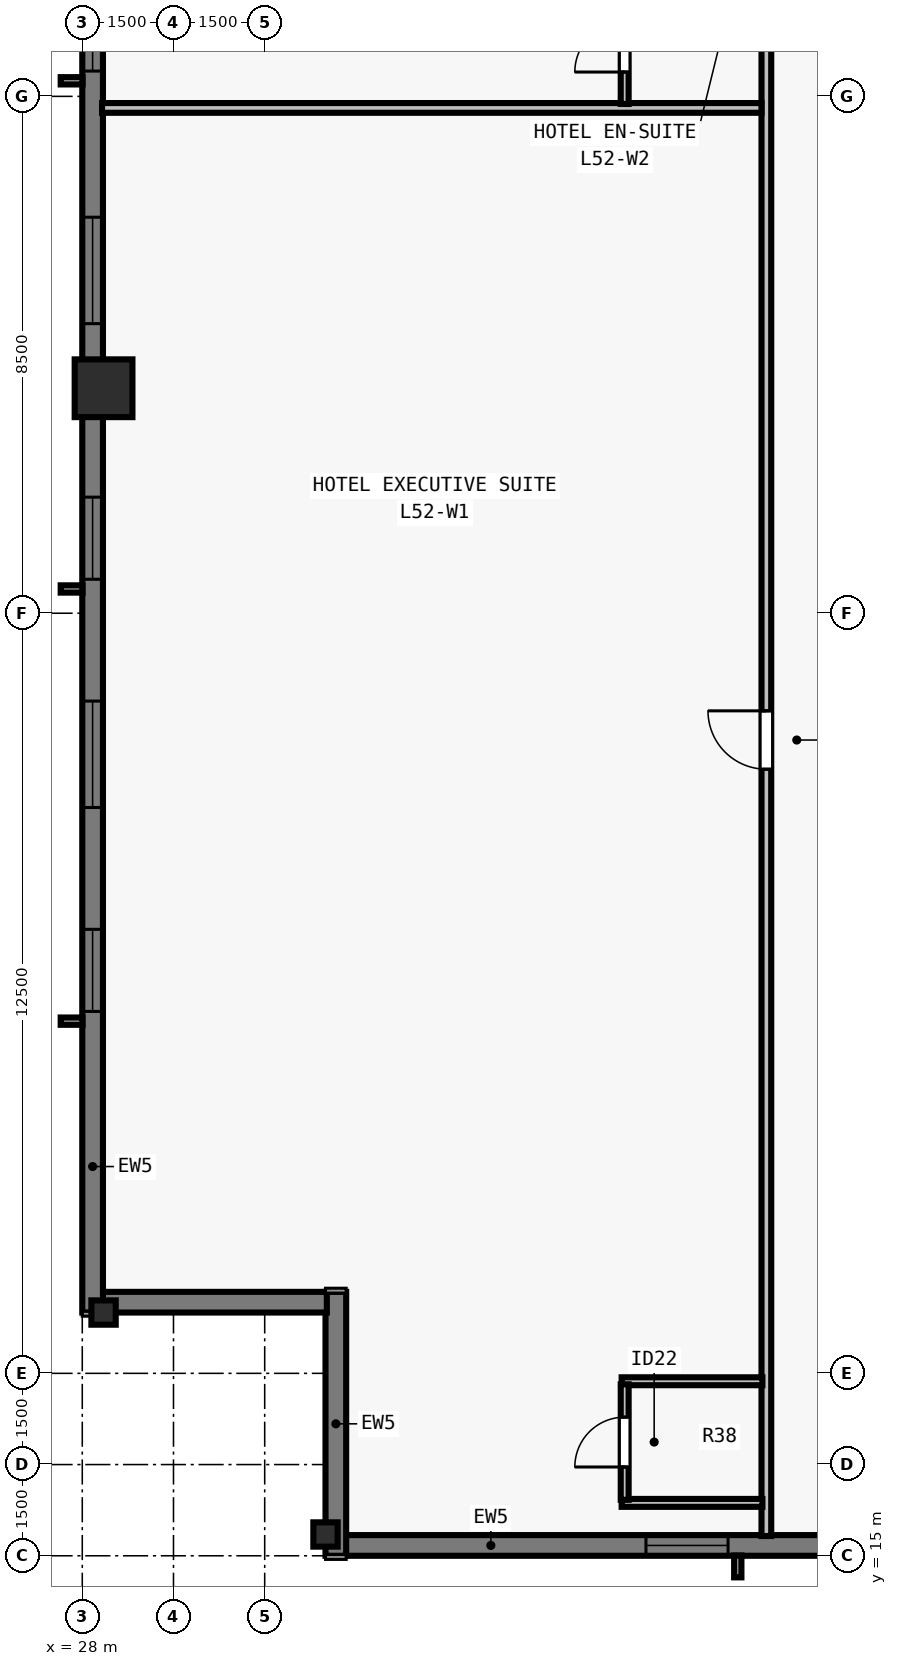
"""IFC4 building model, lengths in metres.
Left out: names, types, materials, properties, quantities, classifications, styles, units other than length and angle.
Written with IfcOpenShell. Run it as: python <this file> out.ifc"""

import sys

from ifc_helpers import new_model, si_unit, direction, frame, frame_2d, origin, origin_2d, place, context, subcontext, project, spatial, rectangle, i_section, extrude, element, fill, save


model = new_model("IFC4")
c1 = context("Model", 3, precision=1e-05, world=origin(), true_north=direction((0.0, 1.0)))
c2 = subcontext(c1, "Body", "Model", "MODEL_VIEW")
j1 = project(units=[si_unit("LENGTHUNIT", "METRE"), si_unit("PLANEANGLEUNIT", "RADIAN")], contexts=[c1])
p1 = place(None, origin())
s1 = spatial("IfcSite", under=j1, at=p1, CompositionType="ELEMENT")
p2 = place(p1, origin())
s2 = spatial("IfcBuilding", under=s1, at=p2, CompositionType="ELEMENT")
p3 = place(p2, frame((0.0, 0.0, 190.0)))
s3 = spatial("IfcBuildingStorey", under=s2, at=p3, CompositionType="ELEMENT", Elevation=190.0)
p4 = place(p3, frame((32.0, 15.35, 0.0), z_axis=(0.0, 0.0, 1.0), x_axis=(1.0, 0.0, 0.0)))
e1 = element("IfcColumn", 1, at=p4, inside=s3, PredefinedType="COLUMN", context=c2, shape_type="SweptSolid", body=[
    extrude(i_section(OverallWidth=0.4, OverallDepth=0.4, WebThickness=0.022, FlangeThickness=0.036, at=origin_2d()), origin(), (0.0, 0.0, 1.0), 3.5),
])
p5 = place(p3, frame((28.35, 34.2, 0.0), z_axis=(0.0, 0.0, 1.0), x_axis=(0.0, 1.0, 0.0)))
e2 = element("IfcColumn", 2, at=p5, inside=s3, PredefinedType="COLUMN", context=c2, shape_type="SweptSolid", body=[
    extrude(rectangle(XDim=0.95, YDim=0.95, at=origin_2d()), origin(), (0.0, 0.0, 1.0), 3.5),
])
p6 = place(p3, frame((28.35, 19.0, 0.0), z_axis=(0.0, 0.0, 1.0), x_axis=(0.0, 1.0, 0.0)))
e3 = element("IfcColumn", 3, at=p6, inside=s3, PredefinedType="COLUMN", context=c2, shape_type="SweptSolid", body=[
    extrude(i_section(OverallWidth=0.4, OverallDepth=0.4, WebThickness=0.022, FlangeThickness=0.036, at=origin_2d()), origin(), (0.0, 0.0, 1.0), 3.5),
])
p7 = place(p3, frame((72.0, 15.17, 0.0), z_axis=(0.0, 0.0, 1.0), x_axis=(-1.0, 0.0, 0.0)))
e4 = element("IfcWall", 4, at=p7, inside=s3, PredefinedType="SOLIDWALL", context=c2, shape_type="SweptSolid", body=[
    extrude(rectangle(XDim=39.682, YDim=0.34, at=frame_2d((19.841, 0.0))), origin(), (0.0, 0.0, 1.0), 3.24),
])
p8 = place(p7, frame((4.502, 0.0, 0.8)))
e5 = element("IfcOpeningElement", 5, at=p8, cuts=e4, PredefinedType="OPENING", context=c2, shape_type="SweptSolid", body=[
    extrude(rectangle(XDim=1.35, YDim=1.62, at=frame_2d((0.675, 0.81))), frame((0.0, 0.18, 0.0), z_axis=(0.0, -1.0, 0.0), x_axis=(1.0, 0.0, 0.0)), (0.0, 0.0, 1.0), 0.36),
])
p9 = place(p7, frame((8.755, 0.0, 0.8)))
e6 = element("IfcOpeningElement", 6, at=p9, cuts=e4, PredefinedType="OPENING", context=c2, shape_type="SweptSolid", body=[
    extrude(rectangle(XDim=1.75, YDim=1.62, at=frame_2d((0.875, 0.81))), frame((0.0, 0.18, 0.0), z_axis=(0.0, -1.0, 0.0), x_axis=(1.0, 0.0, 0.0)), (0.0, 0.0, 1.0), 0.36),
])
p10 = place(p7, frame((12.059, 0.0, 0.8)))
e7 = element("IfcOpeningElement", 7, at=p10, cuts=e4, PredefinedType="OPENING", context=c2, shape_type="SweptSolid", body=[
    extrude(rectangle(XDim=1.35, YDim=1.62, at=frame_2d((0.675, 0.81))), frame((0.0, 0.18, 0.0), z_axis=(0.0, -1.0, 0.0), x_axis=(1.0, 0.0, 0.0)), (0.0, 0.0, 1.0), 0.36),
])
p11 = place(p7, frame((16.262, 0.0, 0.8)))
e8 = element("IfcOpeningElement", 8, at=p11, cuts=e4, PredefinedType="OPENING", context=c2, shape_type="SweptSolid", body=[
    extrude(rectangle(XDim=1.75, YDim=1.62, at=frame_2d((0.875, 0.81))), frame((0.0, 0.18, 0.0), z_axis=(0.0, -1.0, 0.0), x_axis=(1.0, 0.0, 0.0)), (0.0, 0.0, 1.0), 0.36),
])
p12 = place(p7, frame((20.016, 0.0, 0.8)))
e9 = element("IfcOpeningElement", 9, at=p12, cuts=e4, PredefinedType="OPENING", context=c2, shape_type="SweptSolid", body=[
    extrude(rectangle(XDim=1.35, YDim=1.62, at=frame_2d((0.675, 0.81))), frame((0.0, 0.18, 0.0), z_axis=(0.0, -1.0, 0.0), x_axis=(1.0, 0.0, 0.0)), (0.0, 0.0, 1.0), 0.36),
])
p13 = place(p7, frame((22.07, 0.0, 0.8)))
e10 = element("IfcOpeningElement", 10, at=p13, cuts=e4, PredefinedType="OPENING", context=c2, shape_type="SweptSolid", body=[
    extrude(rectangle(XDim=1.75, YDim=1.62, at=frame_2d((0.875, 0.81))), frame((0.0, 0.18, 0.0), z_axis=(0.0, -1.0, 0.0), x_axis=(1.0, 0.0, 0.0)), (0.0, 0.0, 1.0), 0.36),
])
p14 = place(p7, frame((26.273, 0.0, 0.8)))
e11 = element("IfcOpeningElement", 11, at=p14, cuts=e4, PredefinedType="OPENING", context=c2, shape_type="SweptSolid", body=[
    extrude(rectangle(XDim=1.35, YDim=1.62, at=frame_2d((0.675, 0.81))), frame((0.0, 0.18, 0.0), z_axis=(0.0, -1.0, 0.0), x_axis=(1.0, 0.0, 0.0)), (0.0, 0.0, 1.0), 0.36),
])
p15 = place(p7, frame((28.377, 0.0, 0.8)))
e12 = element("IfcOpeningElement", 12, at=p15, cuts=e4, PredefinedType="OPENING", context=c2, shape_type="SweptSolid", body=[
    extrude(rectangle(XDim=1.75, YDim=1.62, at=frame_2d((0.875, 0.81))), frame((0.0, 0.18, 0.0), z_axis=(0.0, -1.0, 0.0), x_axis=(1.0, 0.0, 0.0)), (0.0, 0.0, 1.0), 0.36),
])
p16 = place(p7, frame((33.38, 0.0, 0.8)))
e13 = element("IfcOpeningElement", 13, at=p16, cuts=e4, PredefinedType="OPENING", context=c2, shape_type="SweptSolid", body=[
    extrude(rectangle(XDim=1.35, YDim=1.62, at=frame_2d((0.675, 0.81))), frame((0.0, 0.18, 0.0), z_axis=(0.0, -1.0, 0.0), x_axis=(1.0, 0.0, 0.0)), (0.0, 0.0, 1.0), 0.36),
])
p17 = place(p3, frame((32.17, 15.0, 0.0), z_axis=(0.0, 0.0, 1.0), x_axis=(0.0, 1.0, 0.0)))
e14 = element("IfcWall", 14, at=p17, inside=s3, PredefinedType="SOLIDWALL", context=c2, shape_type="SweptSolid", body=[
    extrude(rectangle(XDim=4.34, YDim=0.34, at=frame_2d((2.17, 0.0))), origin(), (0.0, 0.0, 1.0), 3.24),
])
p18 = place(p3, frame((32.022, 19.17, 0.0), z_axis=(0.0, 0.0, 1.0), x_axis=(-1.0, 0.0, 0.0)))
e15 = element("IfcWall", 15, at=p18, inside=s3, PredefinedType="SOLIDWALL", context=c2, shape_type="SweptSolid", body=[
    extrude(rectangle(XDim=3.704, YDim=0.34, at=frame_2d((1.852, 0.0))), origin(), (0.0, 0.0, 1.0), 3.24),
])
p19 = place(p3, frame((28.17, 19.0, 0.0), z_axis=(0.0, 0.0, 1.0), x_axis=(0.0, 1.0, 0.0)))
e16 = element("IfcWall", 16, at=p19, inside=s3, PredefinedType="SOLIDWALL", context=c2, shape_type="SweptSolid", body=[
    extrude(rectangle(XDim=39.682, YDim=0.34, at=frame_2d((19.841, 0.0))), origin(), (0.0, 0.0, 1.0), 3.24),
])
p20 = place(p19, frame((4.952, 0.0, 0.8)))
e17 = element("IfcOpeningElement", 17, at=p20, cuts=e16, PredefinedType="OPENING", context=c2, shape_type="SweptSolid", body=[
    extrude(rectangle(XDim=1.35, YDim=1.62, at=frame_2d((0.675, 0.81))), frame((0.0, 0.18, 0.0), z_axis=(0.0, -1.0, 0.0), x_axis=(1.0, 0.0, 0.0)), (0.0, 0.0, 1.0), 0.36),
])
p21 = place(p19, frame((8.305, 0.0, 0.8)))
e18 = element("IfcOpeningElement", 18, at=p21, cuts=e16, PredefinedType="OPENING", context=c2, shape_type="SweptSolid", body=[
    extrude(rectangle(XDim=1.75, YDim=1.62, at=frame_2d((0.875, 0.81))), frame((0.0, 0.18, 0.0), z_axis=(0.0, -1.0, 0.0), x_axis=(1.0, 0.0, 0.0)), (0.0, 0.0, 1.0), 0.36),
])
p22 = place(p19, frame((12.059, 0.0, 0.8)))
e19 = element("IfcOpeningElement", 19, at=p22, cuts=e16, PredefinedType="OPENING", context=c2, shape_type="SweptSolid", body=[
    extrude(rectangle(XDim=1.35, YDim=1.62, at=frame_2d((0.675, 0.81))), frame((0.0, 0.18, 0.0), z_axis=(0.0, -1.0, 0.0), x_axis=(1.0, 0.0, 0.0)), (0.0, 0.0, 1.0), 0.36),
])
p23 = place(p19, frame((16.262, 0.0, 0.8)))
e20 = element("IfcOpeningElement", 20, at=p23, cuts=e16, PredefinedType="OPENING", context=c2, shape_type="SweptSolid", body=[
    extrude(rectangle(XDim=1.75, YDim=1.62, at=frame_2d((0.875, 0.81))), frame((0.0, 0.18, 0.0), z_axis=(0.0, -1.0, 0.0), x_axis=(1.0, 0.0, 0.0)), (0.0, 0.0, 1.0), 0.36),
])
p24 = place(p19, frame((20.416, 0.0, 0.8)))
e21 = element("IfcOpeningElement", 21, at=p24, cuts=e16, PredefinedType="OPENING", context=c2, shape_type="SweptSolid", body=[
    extrude(rectangle(XDim=1.35, YDim=1.62, at=frame_2d((0.675, 0.81))), frame((0.0, 0.18, 0.0), z_axis=(0.0, -1.0, 0.0), x_axis=(1.0, 0.0, 0.0)), (0.0, 0.0, 1.0), 0.36),
])
p25 = place(p19, frame((22.07, 0.0, 0.8)))
e22 = element("IfcOpeningElement", 22, at=p25, cuts=e16, PredefinedType="OPENING", context=c2, shape_type="SweptSolid", body=[
    extrude(rectangle(XDim=1.75, YDim=1.62, at=frame_2d((0.875, 0.81))), frame((0.0, 0.18, 0.0), z_axis=(0.0, -1.0, 0.0), x_axis=(1.0, 0.0, 0.0)), (0.0, 0.0, 1.0), 0.36),
])
p26 = place(p19, frame((26.273, 0.0, 0.8)))
e23 = element("IfcOpeningElement", 23, at=p26, cuts=e16, PredefinedType="OPENING", context=c2, shape_type="SweptSolid", body=[
    extrude(rectangle(XDim=1.35, YDim=1.62, at=frame_2d((0.675, 0.81))), frame((0.0, 0.18, 0.0), z_axis=(0.0, -1.0, 0.0), x_axis=(1.0, 0.0, 0.0)), (0.0, 0.0, 1.0), 0.36),
])
p27 = place(p19, frame((29.627, 0.0, 0.8)))
e24 = element("IfcOpeningElement", 24, at=p27, cuts=e16, PredefinedType="OPENING", context=c2, shape_type="SweptSolid", body=[
    extrude(rectangle(XDim=1.75, YDim=1.62, at=frame_2d((0.875, 0.81))), frame((0.0, 0.18, 0.0), z_axis=(0.0, -1.0, 0.0), x_axis=(1.0, 0.0, 0.0)), (0.0, 0.0, 1.0), 0.36),
])
p28 = place(p19, frame((33.38, 0.0, 0.8)))
e25 = element("IfcOpeningElement", 25, at=p28, cuts=e16, PredefinedType="OPENING", context=c2, shape_type="SweptSolid", body=[
    extrude(rectangle(XDim=1.35, YDim=1.62, at=frame_2d((0.675, 0.81))), frame((0.0, 0.18, 0.0), z_axis=(0.0, -1.0, 0.0), x_axis=(1.0, 0.0, 0.0)), (0.0, 0.0, 1.0), 0.36),
])
p29 = place(p3, frame((39.25, 15.325, 0.0), z_axis=(0.0, 0.0, 1.0), x_axis=(0.0, 1.0, 0.0)))
e26 = element("IfcWall", 26, at=p29, inside=s3, PredefinedType="PARTITIONING", context=c2, shape_type="SweptSolid", body=[
    extrude(rectangle(XDim=47.35, YDim=0.16, at=frame_2d((23.675, 0.0))), origin(), (0.0, 0.0, 1.0), 2.515),
])
p30 = place(p29, frame((12.61, 0.0, 0.0)))
e27 = element("IfcOpeningElement", 27, at=p30, cuts=e26, PredefinedType="OPENING", context=c2, shape_type="SweptSolid", body=[
    extrude(rectangle(XDim=0.96, YDim=2.15, at=frame_2d((0.48, 1.075))), frame((0.0, 0.09, 0.0), z_axis=(0.0, -1.0, 0.0), x_axis=(1.0, 0.0, 0.0)), (0.0, 0.0, 1.0), 0.18),
])
p31 = place(p29, frame((35.965, 0.0, 0.0)))
e28 = element("IfcOpeningElement", 28, at=p31, cuts=e26, PredefinedType="OPENING", context=c2, shape_type="SweptSolid", body=[
    extrude(rectangle(XDim=0.96, YDim=2.15, at=frame_2d((0.48, 1.075))), frame((0.0, 0.09, 0.0), z_axis=(0.0, -1.0, 0.0), x_axis=(1.0, 0.0, 0.0)), (0.0, 0.0, 1.0), 0.18),
])
for number, where, z_axis, x_axis in (
    (29, (36.87, 15.87, 0.0), (0.0, 0.0, 1.0), (1.0, 0.0, 0.0)),
    (30, (36.87, 17.87, 0.0), (0.0, 0.0, 1.0), (1.0, 0.0, 0.0)),
):
    element("IfcWall", number, at=place(p3, frame(where, z_axis=z_axis, x_axis=x_axis)), inside=s3, PredefinedType="PLUMBINGWALL", context=c2, shape_type="SweptSolid", body=[
        extrude(rectangle(XDim=2.315, YDim=0.13, at=frame_2d((1.157, 0.0))), origin(), (0.0, 0.0, 1.0), 3.24),
    ])
p32 = place(p3, frame((36.92, 15.92, 0.0), z_axis=(0.0, 0.0, 1.0), x_axis=(0.0, 1.0, 0.0)))
e31 = element("IfcWall", 31, at=p32, inside=s3, PredefinedType="PLUMBINGWALL", context=c2, shape_type="SweptSolid", body=[
    extrude(rectangle(XDim=1.9, YDim=0.13, at=frame_2d((0.95, 0.0))), origin(), (0.0, 0.0, 1.0), 3.24),
])
p33 = place(p32, frame((0.54, 0.0, 0.0)))
e32 = element("IfcOpeningElement", 32, at=p33, cuts=e31, PredefinedType="OPENING", context=c2, shape_type="SweptSolid", body=[
    extrude(rectangle(XDim=0.82, YDim=2.1, at=frame_2d((0.41, 1.05))), frame((0.0, 0.075, 0.0), z_axis=(0.0, -1.0, 0.0), x_axis=(1.0, 0.0, 0.0)), (0.0, 0.0, 1.0), 0.15),
])
p34 = place(p3, frame((28.325, 38.81, 0.0), z_axis=(0.0, 0.0, 1.0), x_axis=(1.0, 0.0, 0.0)))
e33 = element("IfcWall", 33, at=p34, inside=s3, PredefinedType="PARTITIONING", context=c2, shape_type="SweptSolid", body=[
    extrude(rectangle(XDim=10.845, YDim=0.16, at=frame_2d((5.422, 0.0))), origin(), (0.0, 0.0, 1.0), 2.856),
])
p35 = place(p3, frame((36.92, 38.875, 0.0), z_axis=(0.0, 0.0, 1.0), x_axis=(0.0, 1.0, 0.0)))
e34 = element("IfcWall", 34, at=p35, inside=s3, PredefinedType="PLUMBINGWALL", context=c2, shape_type="SweptSolid", body=[
    extrude(rectangle(XDim=1.885, YDim=0.13, at=frame_2d((0.942, 0.0))), origin(), (0.0, 0.0, 1.0), 3.24),
])
p36 = place(p35, frame((0.525, 0.0, 0.0)))
e35 = element("IfcOpeningElement", 35, at=p36, cuts=e34, PredefinedType="OPENING", context=c2, shape_type="SweptSolid", body=[
    extrude(rectangle(XDim=0.82, YDim=2.1, at=frame_2d((0.41, 1.05))), frame((0.0, 0.075, 0.0), z_axis=(0.0, -1.0, 0.0), x_axis=(1.0, 0.0, 0.0)), (0.0, 0.0, 1.0), 0.15),
])
p37 = place(p16, origin())
e36 = element("IfcWindow", 36, at=p37, inside=s3, PartitioningType="SINGLE_PANEL", PredefinedType="WINDOW", context=c2, shape_type="SweptSolid", body=[
    extrude(rectangle(XDim=1.35, YDim=1.62, at=frame_2d((0.675, 0.81))), frame((0.0, -0.05, 0.0), z_axis=(0.0, -1.0, 0.0), x_axis=(1.0, 0.0, 0.0)), (0.0, 0.0, 1.0), 0.06),
])
fill(e13, e36)
p38 = place(p20, origin())
e37 = element("IfcWindow", 37, at=p38, inside=s3, PartitioningType="SINGLE_PANEL", PredefinedType="WINDOW", context=c2, shape_type="SweptSolid", body=[
    extrude(rectangle(XDim=1.35, YDim=1.62, at=frame_2d((0.675, 0.81))), frame((0.0, -0.05, 0.0), z_axis=(0.0, -1.0, 0.0), x_axis=(1.0, 0.0, 0.0)), (0.0, 0.0, 1.0), 0.06),
])
fill(e17, e37)
p39 = place(p21, origin())
e38 = element("IfcWindow", 38, at=p39, inside=s3, PartitioningType="SINGLE_PANEL", PredefinedType="WINDOW", context=c2, shape_type="SweptSolid", body=[
    extrude(rectangle(XDim=1.75, YDim=1.62, at=frame_2d((0.875, 0.81))), frame((0.0, -0.05, 0.0), z_axis=(0.0, -1.0, 0.0), x_axis=(1.0, 0.0, 0.0)), (0.0, 0.0, 1.0), 0.06),
])
fill(e18, e38)
p40 = place(p22, origin())
e39 = element("IfcWindow", 39, at=p40, inside=s3, PartitioningType="SINGLE_PANEL", PredefinedType="WINDOW", context=c2, shape_type="SweptSolid", body=[
    extrude(rectangle(XDim=1.35, YDim=1.62, at=frame_2d((0.675, 0.81))), frame((0.0, -0.05, 0.0), z_axis=(0.0, -1.0, 0.0), x_axis=(1.0, 0.0, 0.0)), (0.0, 0.0, 1.0), 0.06),
])
fill(e19, e39)
p41 = place(p23, origin())
e40 = element("IfcWindow", 40, at=p41, inside=s3, PartitioningType="SINGLE_PANEL", PredefinedType="WINDOW", context=c2, shape_type="SweptSolid", body=[
    extrude(rectangle(XDim=1.75, YDim=1.62, at=frame_2d((0.875, 0.81))), frame((0.0, -0.05, 0.0), z_axis=(0.0, -1.0, 0.0), x_axis=(1.0, 0.0, 0.0)), (0.0, 0.0, 1.0), 0.06),
])
fill(e20, e40)
p42 = place(p24, origin())
e41 = element("IfcWindow", 41, at=p42, inside=s3, PartitioningType="SINGLE_PANEL", PredefinedType="WINDOW", context=c2, shape_type="SweptSolid", body=[
    extrude(rectangle(XDim=1.35, YDim=1.62, at=frame_2d((0.675, 0.81))), frame((0.0, -0.05, 0.0), z_axis=(0.0, -1.0, 0.0), x_axis=(1.0, 0.0, 0.0)), (0.0, 0.0, 1.0), 0.06),
])
fill(e21, e41)
p43 = place(p33, origin())
e42 = element("IfcDoor", 42, at=p43, inside=s3, OperationType="SINGLE_SWING_LEFT", PredefinedType="DOOR", context=c2, shape_type="SweptSolid", body=[
    extrude(rectangle(XDim=0.82, YDim=2.1, at=frame_2d((0.41, 1.05))), frame((0.0, 0.025, 0.0), z_axis=(0.0, -1.0, 0.0), x_axis=(1.0, 0.0, 0.0)), (0.0, 0.0, 1.0), 0.05),
])
fill(e32, e42)
p44 = place(p30, origin())
e43 = element("IfcDoor", 43, at=p44, inside=s3, OperationType="SINGLE_SWING_RIGHT", PredefinedType="DOOR", context=c2, shape_type="SweptSolid", body=[
    extrude(rectangle(XDim=0.96, YDim=2.15, at=frame_2d((0.48, 1.075))), frame((0.0, 0.025, 0.0), z_axis=(0.0, -1.0, 0.0), x_axis=(1.0, 0.0, 0.0)), (0.0, 0.0, 1.0), 0.05),
])
fill(e27, e43)
p45 = place(p36, origin())
e44 = element("IfcDoor", 44, at=p45, inside=s3, OperationType="SINGLE_SWING_LEFT", PredefinedType="DOOR", context=c2, shape_type="SweptSolid", body=[
    extrude(rectangle(XDim=0.82, YDim=2.1, at=frame_2d((0.41, 1.05))), frame((0.0, 0.025, 0.0), z_axis=(0.0, -1.0, 0.0), x_axis=(1.0, 0.0, 0.0)), (0.0, 0.0, 1.0), 0.05),
])
fill(e35, e44)
save(model, sys.argv[1])
